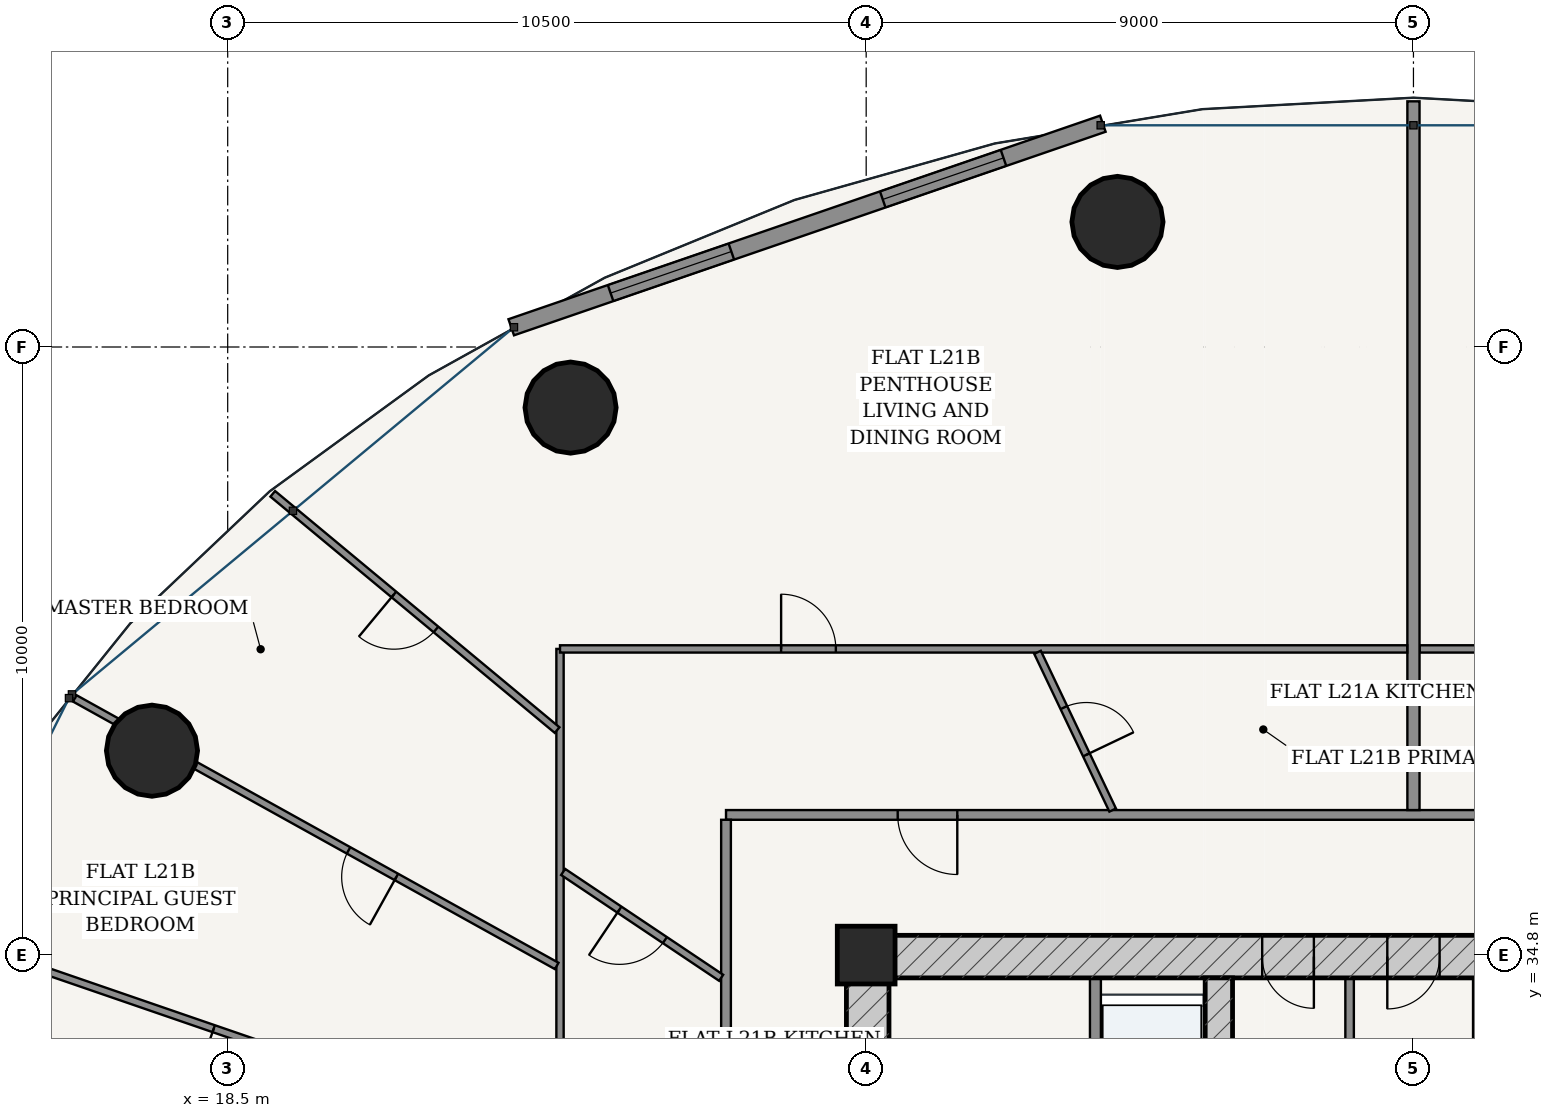
"""IFC4 building model, lengths in metres.
Left out: names, types, materials, properties, quantities, classifications, styles, units other than length and angle.
Written with IfcOpenShell. Run it as: python <this file> out.ifc"""

import sys

from ifc_helpers import new_model, si_unit, direction, frame, frame_2d, origin, origin_2d, place, context, subcontext, project, spatial, rectangle, hollow_circle, extrude, source, transform, mapped, element, fill, save


model = new_model("IFC4")
c1 = context("Model", 3, precision=1e-05, world=origin(), true_north=direction((-0.2419218956, 0.970295726276)))
c2 = subcontext(c1, "Body", "Model", "MODEL_VIEW")
j1 = project(units=[si_unit("LENGTHUNIT", "METRE"), si_unit("PLANEANGLEUNIT", "RADIAN")], contexts=[c1])
p1 = place(None, origin())
s1 = spatial("IfcSite", under=j1, at=p1, CompositionType="ELEMENT")
p2 = place(p1, origin())
s2 = spatial("IfcBuilding", under=s1, at=p2, CompositionType="ELEMENT")
p3 = place(p2, frame((0.0, 0.0, 83.4)))
s3 = spatial("IfcBuildingStorey", under=s2, at=p3, CompositionType="ELEMENT", Elevation=83.4)
p4 = place(p3, frame((29.0, 34.8, 0.0), z_axis=(0.0, 0.0, 1.0), x_axis=(1.0, 0.0, 0.0)))
e1 = element("IfcColumn", 1, at=p4, inside=s3, PredefinedType="COLUMN", context=c2, shape_type="SweptSolid", body=[
    extrude(rectangle(XDim=0.95, YDim=0.95, at=origin_2d()), origin(), (0.0, 0.0, 1.0), 3.6),
])
p5 = place(p3, frame((28.675, 34.775, 0.0), z_axis=(0.0, 0.0, 1.0), x_axis=(1.0, 0.0, 0.0)))
e2 = element("IfcWall", 2, at=p5, inside=s3, PredefinedType="SHEAR", context=c2, shape_type="SweptSolid", body=[
    extrude(rectangle(XDim=18.65, YDim=0.7, at=frame_2d((9.325, 0.0))), origin(), (0.0, 0.0, 1.0), 3.325),
])
p6 = place(p5, frame((6.837, 0.0, 0.0)))
e3 = element("IfcOpeningElement", 3, at=p6, cuts=e2, PredefinedType="OPENING", context=c2, shape_type="SweptSolid", body=[
    extrude(rectangle(XDim=0.85, YDim=2.1, at=frame_2d((0.425, 1.05))), frame((0.0, 0.36, 0.0), z_axis=(0.0, -1.0, 0.0), x_axis=(1.0, 0.0, 0.0)), (0.0, 0.0, 1.0), 0.72),
])
p7 = place(p5, frame((8.895, 0.0, 0.0)))
e4 = element("IfcOpeningElement", 4, at=p7, cuts=e2, PredefinedType="OPENING", context=c2, shape_type="SweptSolid", body=[
    extrude(rectangle(XDim=0.86, YDim=2.1, at=frame_2d((0.43, 1.05))), frame((0.0, 0.36, 0.0), z_axis=(0.0, -1.0, 0.0), x_axis=(1.0, 0.0, 0.0)), (0.0, 0.0, 1.0), 0.72),
])
p8 = place(p5, frame((10.962, 0.0, 0.0)))
e5 = element("IfcOpeningElement", 5, at=p8, cuts=e2, PredefinedType="OPENING", context=c2, shape_type="SweptSolid", body=[
    extrude(rectangle(XDim=0.85, YDim=2.1, at=frame_2d((0.425, 1.05))), frame((0.0, 0.36, 0.0), z_axis=(0.0, -1.0, 0.0), x_axis=(1.0, 0.0, 0.0)), (0.0, 0.0, 1.0), 0.72),
])
p9 = place(p3, frame((29.025, 19.175, 0.0), z_axis=(0.0, 0.0, 1.0), x_axis=(0.0, 1.0, 0.0)))
e6 = element("IfcWall", 6, at=p9, inside=s3, PredefinedType="SHEAR", context=c2, shape_type="SweptSolid", body=[
    extrude(rectangle(XDim=15.25, YDim=0.7, at=frame_2d((7.625, 0.0))), origin(), (0.0, 0.0, 1.0), 3.325),
])
p10 = place(p9, frame((9.875, 0.0, 0.0)))
e7 = element("IfcOpeningElement", 7, at=p10, cuts=e6, PredefinedType="OPENING", context=c2, shape_type="SweptSolid", body=[
    extrude(rectangle(XDim=1.5, YDim=2.2, at=frame_2d((0.75, 1.1))), frame((0.0, 0.36, 0.0), z_axis=(0.0, -1.0, 0.0), x_axis=(1.0, 0.0, 0.0)), (0.0, 0.0, 1.0), 0.72),
])
p11 = place(p3, frame((34.8, 19.175, 0.0), z_axis=(0.0, 0.0, 1.0), x_axis=(0.0, 1.0, 0.0)))
e8 = element("IfcWall", 8, at=p11, inside=s3, PredefinedType="SHEAR", context=c2, shape_type="SweptSolid", body=[
    extrude(rectangle(XDim=15.25, YDim=0.45, at=frame_2d((7.625, 0.0))), origin(), (0.0, 0.0, 1.0), 3.325),
])
p12 = place(p11, frame((7.8, 0.0, 0.0)))
e9 = element("IfcOpeningElement", 9, at=p12, cuts=e8, PredefinedType="OPENING", context=c2, shape_type="SweptSolid", body=[
    extrude(rectangle(XDim=1.05, YDim=2.15, at=frame_2d((0.525, 1.075))), frame((0.0, 0.235, 0.0), z_axis=(0.0, -1.0, 0.0), x_axis=(1.0, 0.0, 0.0)), (0.0, 0.0, 1.0), 0.47),
])
for number, where, z_axis, x_axis in (
    (10, (33.133, 46.857, 0.0), (0.0, 0.0, 1.0), (1.0, 0.0, 0.0)),
    (11, (24.138, 43.803, 0.0), (0.0, 0.0, 1.0), (1.0, 0.0, 0.0)),
    (12, (17.255, 38.161, 0.0), (0.0, 0.0, 1.0), (1.0, 0.0, 0.0)),
):
    element("IfcColumn", number, at=place(p3, frame(where, z_axis=z_axis, x_axis=x_axis)), inside=s3, PredefinedType="COLUMN", context=c2, shape_type="SweptSolid", body=[
        extrude(hollow_circle(Radius=0.75, WallThickness=0.045, at=origin_2d()), origin(), (0.0, 0.0, 1.0), 3.6),
    ])
p13 = place(p3, frame((32.892, 48.472, 0.0), z_axis=(0.0, 0.0, 1.0), x_axis=(-0.945597432299, -0.325339047809, 0.0)))
e13 = element("IfcWall", 13, at=p13, inside=s3, PredefinedType="SOLIDWALL", context=c2, shape_type="SweptSolid", body=[
    extrude(rectangle(XDim=10.289, YDim=0.28, at=frame_2d((5.145, 0.0))), origin(), (0.0, 0.0, 1.0), 3.325),
])
p14 = place(p13, frame((1.728, 0.0, 0.85)))
e14 = element("IfcOpeningElement", 14, at=p14, cuts=e13, PredefinedType="OPENING", context=c2, shape_type="SweptSolid", body=[
    extrude(rectangle(XDim=2.1, YDim=1.95, at=frame_2d((1.05, 0.975))), frame((0.0, 0.15, 0.0), z_axis=(0.0, -1.0, 0.0), x_axis=(1.0, 0.0, 0.0)), (0.0, 0.0, 1.0), 0.3),
])
p15 = place(p13, frame((6.461, 0.0, 0.85)))
e15 = element("IfcOpeningElement", 15, at=p15, cuts=e13, PredefinedType="OPENING", context=c2, shape_type="SweptSolid", body=[
    extrude(rectangle(XDim=2.1, YDim=1.95, at=frame_2d((1.05, 0.975))), frame((0.0, 0.15, 0.0), z_axis=(0.0, -1.0, 0.0), x_axis=(1.0, 0.0, 0.0)), (0.0, 0.0, 1.0), 0.3),
])
p16 = place(p3, frame((32.77, 28.52, 0.0), z_axis=(0.0, 0.0, 1.0), x_axis=(0.0, 1.0, 0.0)))
e16 = element("IfcWall", 16, at=p16, inside=s3, PredefinedType="PARTITIONING", context=c2, shape_type="SweptSolid", body=[
    extrude(rectangle(XDim=5.905, YDim=0.18, at=frame_2d((2.953, 0.0))), origin(), (0.0, 0.0, 1.0), 3.325),
])
p17 = place(p16, frame((3.655, 0.0, 0.0)))
e17 = element("IfcOpeningElement", 17, at=p17, cuts=e16, PredefinedType="OPENING", context=c2, shape_type="SweptSolid", body=[
    extrude(rectangle(XDim=1.15, YDim=2.2, at=frame_2d((0.575, 1.1))), frame((0.0, 0.1, 0.0), z_axis=(0.0, -1.0, 0.0), x_axis=(1.0, 0.0, 0.0)), (0.0, 0.0, 1.0), 0.2),
])
p18 = place(p16, frame((0.73, 0.0, 0.0)))
e18 = element("IfcOpeningElement", 18, at=p18, cuts=e16, PredefinedType="OPENING", context=c2, shape_type="SweptSolid", body=[
    extrude(rectangle(XDim=1.2, YDim=2.25, at=frame_2d((0.6, 1.125))), frame((0.0, 0.1, 0.0), z_axis=(0.0, -1.0, 0.0), x_axis=(1.0, 0.0, 0.0)), (0.0, 0.0, 1.0), 0.2),
])
for number, where, z_axis, x_axis in (
    (19, (36.95, 31.2, 0.0), (0.0, 0.0, 1.0), (0.0, 1.0, 0.0)),
    (20, (39.05, 31.2, 0.0), (0.0, 0.0, 1.0), (0.0, 1.0, 0.0)),
):
    element("IfcWall", number, at=place(p3, frame(where, z_axis=z_axis, x_axis=x_axis)), inside=s3, PredefinedType="PARTITIONING", context=c2, shape_type="SweptSolid", body=[
        extrude(rectangle(XDim=3.225, YDim=0.14, at=frame_2d((1.613, 0.0))), origin(), (0.0, 0.0, 1.0), 3.325),
    ])
p19 = place(p3, frame((26.695, 37.105, 0.0), z_axis=(0.0, 0.0, 1.0), x_axis=(1.0, 0.0, 0.0)))
e21 = element("IfcWall", 21, at=p19, inside=s3, PredefinedType="PARTITIONING", context=c2, shape_type="SweptSolid", body=[
    extrude(rectangle(XDim=22.61, YDim=0.16, at=frame_2d((11.305, 0.0))), origin(), (0.0, 0.0, 1.0), 2.767),
])
p20 = place(p19, frame((18.812, 0.0, 0.0)))
e22 = element("IfcOpeningElement", 22, at=p20, cuts=e21, PredefinedType="OPENING", context=c2, shape_type="SweptSolid", body=[
    extrude(rectangle(XDim=0.98, YDim=2.2, at=frame_2d((0.49, 1.1))), frame((0.0, 0.09, 0.0), z_axis=(0.0, -1.0, 0.0), x_axis=(1.0, 0.0, 0.0)), (0.0, 0.0, 1.0), 0.18),
])
p21 = place(p19, frame((2.823, 0.0, 0.0)))
e23 = element("IfcOpeningElement", 23, at=p21, cuts=e21, PredefinedType="OPENING", context=c2, shape_type="SweptSolid", body=[
    extrude(rectangle(XDim=0.98, YDim=2.2, at=frame_2d((0.49, 1.1))), frame((0.0, 0.09, 0.0), z_axis=(0.0, -1.0, 0.0), x_axis=(1.0, 0.0, 0.0)), (0.0, 0.0, 1.0), 0.18),
])
p22 = place(p3, frame((26.695, 16.575, 0.0), z_axis=(0.0, 0.0, 1.0), x_axis=(0.0, 1.0, 0.0)))
e24 = element("IfcWall", 24, at=p22, inside=s3, PredefinedType="PARTITIONING", context=c2, shape_type="SweptSolid", body=[
    extrude(rectangle(XDim=20.45, YDim=0.16, at=frame_2d((10.225, 0.0))), origin(), (0.0, 0.0, 1.0), 2.767),
])
p23 = place(p22, frame((1.977, 0.0, 0.0)))
e25 = element("IfcOpeningElement", 25, at=p23, cuts=e24, PredefinedType="OPENING", context=c2, shape_type="SweptSolid", body=[
    extrude(rectangle(XDim=0.98, YDim=2.2, at=frame_2d((0.49, 1.1))), frame((0.0, 0.09, 0.0), z_axis=(0.0, -1.0, 0.0), x_axis=(1.0, 0.0, 0.0)), (0.0, 0.0, 1.0), 0.18),
])
p24 = place(p3, frame((38.102, 39.835, 0.0), z_axis=(0.0, 0.0, 1.0), x_axis=(1.0, 0.0, 0.0)))
e26 = element("IfcWall", 26, at=p24, inside=s3, PredefinedType="PARTITIONING", context=c2, shape_type="SweptSolid", body=[
    extrude(rectangle(XDim=13.933, YDim=0.12, at=frame_2d((6.966, 0.0))), origin(), (0.0, 0.0, 1.0), 2.767),
])
p25 = place(p24, frame((2.769, 0.0, 0.0)))
e27 = element("IfcOpeningElement", 27, at=p25, cuts=e26, PredefinedType="OPENING", context=c2, shape_type="SweptSolid", body=[
    extrude(rectangle(XDim=0.9, YDim=2.15, at=frame_2d((0.45, 1.075))), frame((0.0, 0.07, 0.0), z_axis=(0.0, -1.0, 0.0), x_axis=(1.0, 0.0, 0.0)), (0.0, 0.0, 1.0), 0.14),
])
p26 = place(p3, frame((38.0, 37.185, 0.0), z_axis=(0.0, 0.0, 1.0), x_axis=(0.0, 1.0, 0.0)))
e28 = element("IfcWall", 28, at=p26, inside=s3, PredefinedType="PARTITIONING", context=c2, shape_type="SweptSolid", body=[
    extrude(rectangle(XDim=11.655, YDim=0.2, at=frame_2d((5.828, 0.0))), origin(), (0.0, 0.0, 1.0), 2.767),
])
p27 = place(p3, frame((23.965, 24.583, 0.0), z_axis=(0.0, 0.0, 1.0), x_axis=(0.0, 1.0, 0.0)))
e29 = element("IfcWall", 29, at=p27, inside=s3, PredefinedType="PARTITIONING", context=c2, shape_type="SweptSolid", body=[
    extrude(rectangle(XDim=15.252, YDim=0.12, at=frame_2d((7.626, 0.0))), origin(), (0.0, 0.0, 1.0), 2.767),
])
p28 = place(p3, frame((23.965, 39.835, 0.0), z_axis=(0.0, 0.0, 1.0), x_axis=(1.0, 0.0, 0.0)))
e30 = element("IfcWall", 30, at=p28, inside=s3, PredefinedType="PARTITIONING", context=c2, shape_type="SweptSolid", body=[
    extrude(rectangle(XDim=13.933, YDim=0.12, at=frame_2d((6.966, 0.0))), origin(), (0.0, 0.0, 1.0), 2.767),
])
p29 = place(p28, frame((3.636, 0.0, 0.0)))
e31 = element("IfcOpeningElement", 31, at=p29, cuts=e30, PredefinedType="OPENING", context=c2, shape_type="SweptSolid", body=[
    extrude(rectangle(XDim=0.9, YDim=2.15, at=frame_2d((0.45, 1.075))), frame((0.0, 0.07, 0.0), z_axis=(0.0, -1.0, 0.0), x_axis=(1.0, 0.0, 0.0)), (0.0, 0.0, 1.0), 0.14),
])
p30 = place(p3, frame((23.917, 38.5, 0.0), z_axis=(0.0, 0.0, 1.0), x_axis=(-0.769161827891, 0.63905405289, 0.0)))
e32 = element("IfcWall", 32, at=p30, inside=s3, PredefinedType="PARTITIONING", context=c2, shape_type="SweptSolid", body=[
    extrude(rectangle(XDim=6.08, YDim=0.12, at=frame_2d((3.04, 0.0))), origin(), (0.0, 0.0, 1.0), 2.767),
])
p31 = place(p30, frame((2.59, 0.0, 0.0)))
e33 = element("IfcOpeningElement", 33, at=p31, cuts=e32, PredefinedType="OPENING", context=c2, shape_type="SweptSolid", body=[
    extrude(rectangle(XDim=0.9, YDim=2.15, at=frame_2d((0.45, 1.075))), frame((0.0, 0.07, 0.0), z_axis=(0.0, -1.0, 0.0), x_axis=(1.0, 0.0, 0.0)), (0.0, 0.0, 1.0), 0.14),
])
p32 = place(p3, frame((23.911, 34.622, 0.0), z_axis=(0.0, 0.0, 1.0), x_axis=(-0.874324904351, 0.485341077626, 0.0)))
e34 = element("IfcWall", 34, at=p32, inside=s3, PredefinedType="PARTITIONING", context=c2, shape_type="SweptSolid", body=[
    extrude(rectangle(XDim=9.066, YDim=0.12, at=frame_2d((4.533, 0.0))), origin(), (0.0, 0.0, 1.0), 2.767),
])
p33 = place(p32, frame((3.016, 0.0, 0.0)))
e35 = element("IfcOpeningElement", 35, at=p33, cuts=e34, PredefinedType="OPENING", context=c2, shape_type="SweptSolid", body=[
    extrude(rectangle(XDim=0.9, YDim=2.15, at=frame_2d((0.45, 1.075))), frame((0.0, 0.07, 0.0), z_axis=(0.0, -1.0, 0.0), x_axis=(1.0, 0.0, 0.0)), (0.0, 0.0, 1.0), 0.14),
])
p34 = place(p3, frame((23.906, 31.65, 0.0), z_axis=(0.0, 0.0, 1.0), x_axis=(-0.945573120726, 0.32540970078, 0.0)))
e36 = element("IfcWall", 36, at=p34, inside=s3, PredefinedType="PARTITIONING", context=c2, shape_type="SweptSolid", body=[
    extrude(rectangle(XDim=11.022, YDim=0.12, at=frame_2d((5.511, 0.0))), origin(), (0.0, 0.0, 1.0), 2.767),
])
p35 = place(p34, frame((5.061, 0.0, 0.0)))
e37 = element("IfcOpeningElement", 37, at=p35, cuts=e36, PredefinedType="OPENING", context=c2, shape_type="SweptSolid", body=[
    extrude(rectangle(XDim=0.9, YDim=2.15, at=frame_2d((0.45, 1.075))), frame((0.0, 0.07, 0.0), z_axis=(0.0, -1.0, 0.0), x_axis=(1.0, 0.0, 0.0)), (0.0, 0.0, 1.0), 0.14),
])
p36 = place(p3, frame((33.053, 37.185, 0.0), z_axis=(0.0, 0.0, 1.0), x_axis=(-0.429966564324, 0.902844811451, 0.0)))
e38 = element("IfcWall", 38, at=p36, inside=s3, PredefinedType="PARTITIONING", context=c2, shape_type="SweptSolid", body=[
    extrude(rectangle(XDim=2.873, YDim=0.12, at=frame_2d((1.437, 0.0))), origin(), (0.0, 0.0, 1.0), 3.325),
])
p37 = place(p36, frame((1.007, 0.0, 0.0)))
e39 = element("IfcOpeningElement", 39, at=p37, cuts=e38, PredefinedType="OPENING", context=c2, shape_type="SweptSolid", body=[
    extrude(rectangle(XDim=0.86, YDim=2.15, at=frame_2d((0.43, 1.075))), frame((0.0, 0.07, 0.0), z_axis=(0.0, -1.0, 0.0), x_axis=(1.0, 0.0, 0.0)), (0.0, 0.0, 1.0), 0.14),
])
p38 = place(p3, frame((26.615, 34.427, 0.0), z_axis=(0.0, 0.0, 1.0), x_axis=(-0.830799215213, 0.556572245088, 0.0)))
e40 = element("IfcWall", 40, at=p38, inside=s3, PredefinedType="PARTITIONING", context=c2, shape_type="SweptSolid", body=[
    extrude(rectangle(XDim=3.128, YDim=0.12, at=frame_2d((1.564, 0.0))), origin(), (0.0, 0.0, 1.0), 3.004),
])
p39 = place(p38, frame((1.114, 0.0, 0.0)))
e41 = element("IfcOpeningElement", 41, at=p39, cuts=e40, PredefinedType="OPENING", context=c2, shape_type="SweptSolid", body=[
    extrude(rectangle(XDim=0.9, YDim=2.15, at=frame_2d((0.45, 1.075))), frame((0.0, 0.07, 0.0), z_axis=(0.0, -1.0, 0.0), x_axis=(1.0, 0.0, 0.0)), (0.0, 0.0, 1.0), 0.14),
])
m1 = source(origin(), c2, "Body", "SweptSolid", [
    extrude(rectangle(XDim=2.1, YDim=1.95, at=frame_2d((1.05, 0.975))), frame((0.0, 0.03, 0.0), z_axis=(0.0, -1.0, 0.0), x_axis=(1.0, 0.0, 0.0)), (0.0, 0.0, 1.0), 0.06),
])
p40 = place(p14, origin())
e42 = element("IfcWindow", 42, at=p40, inside=s3, PartitioningType="SINGLE_PANEL", PredefinedType="WINDOW", context=c2, shape_type="MappedRepresentation", body=[
    mapped(m1, transform((0.0, 0.0, 0.0), scale=1.0)),
])
fill(e14, e42)
p41 = place(p15, origin())
e43 = element("IfcWindow", 43, at=p41, inside=s3, PartitioningType="SINGLE_PANEL", PredefinedType="WINDOW", context=c2, shape_type="MappedRepresentation", body=[
    mapped(m1, transform((0.0, 0.0, 0.0), scale=1.0)),
])
fill(e15, e43)
m2 = source(origin(), c2, "Body", "SweptSolid", [
    extrude(rectangle(XDim=0.85, YDim=2.1, at=frame_2d((0.425, 1.05))), frame((0.0, 0.025, 0.0), z_axis=(0.0, -1.0, 0.0), x_axis=(1.0, 0.0, 0.0)), (0.0, 0.0, 1.0), 0.05),
])
p42 = place(p6, frame((0.85, 0.0, 0.0), z_axis=(0.0, 0.0, 1.0), x_axis=(-1.0, 0.0, 0.0)))
e44 = element("IfcDoor", 44, at=p42, inside=s3, OperationType="SINGLE_SWING_LEFT", PredefinedType="DOOR", context=c2, shape_type="MappedRepresentation", body=[
    mapped(m2, transform((0.0, 0.0, 0.0), scale=1.0)),
])
fill(e3, e44)
m3 = source(origin(), c2, "Body", "SweptSolid", [
    extrude(rectangle(XDim=0.86, YDim=2.1, at=frame_2d((0.43, 1.05))), frame((0.0, 0.025, 0.0), z_axis=(0.0, -1.0, 0.0), x_axis=(1.0, 0.0, 0.0)), (0.0, 0.0, 1.0), 0.05),
])
p43 = place(p7, frame((0.86, 0.0, 0.0), z_axis=(0.0, 0.0, 1.0), x_axis=(-1.0, 0.0, 0.0)))
e45 = element("IfcDoor", 45, at=p43, inside=s3, OperationType="SINGLE_SWING_RIGHT", PredefinedType="DOOR", context=c2, shape_type="MappedRepresentation", body=[
    mapped(m3, transform((0.0, 0.0, 0.0), scale=1.0)),
])
fill(e4, e45)
m4 = source(origin(), c2, "Body", "SweptSolid", [
    extrude(rectangle(XDim=0.98, YDim=2.2, at=frame_2d((0.49, 1.1))), frame((0.0, 0.025, 0.0), z_axis=(0.0, -1.0, 0.0), x_axis=(1.0, 0.0, 0.0)), (0.0, 0.0, 1.0), 0.05),
])
p44 = place(p21, frame((0.98, 0.0, 0.0), z_axis=(0.0, 0.0, 1.0), x_axis=(-1.0, 0.0, 0.0)))
e46 = element("IfcDoor", 46, at=p44, inside=s3, OperationType="SINGLE_SWING_LEFT", PredefinedType="DOOR", context=c2, shape_type="MappedRepresentation", body=[
    mapped(m4, transform((0.0, 0.0, 0.0), scale=1.0)),
])
fill(e23, e46)
m5 = source(origin(), c2, "Body", "SweptSolid", [
    extrude(rectangle(XDim=0.86, YDim=2.15, at=frame_2d((0.43, 1.075))), frame((0.0, 0.025, 0.0), z_axis=(0.0, -1.0, 0.0), x_axis=(1.0, 0.0, 0.0)), (0.0, 0.0, 1.0), 0.05),
])
p45 = place(p37, frame((0.86, 0.0, 0.0), z_axis=(0.0, 0.0, 1.0), x_axis=(-1.0, 0.0, 0.0)))
e47 = element("IfcDoor", 47, at=p45, inside=s3, OperationType="SINGLE_SWING_RIGHT", PredefinedType="DOOR", context=c2, shape_type="MappedRepresentation", body=[
    mapped(m5, transform((0.0, 0.0, 0.0), scale=1.0)),
])
fill(e39, e47)
m6 = source(origin(), c2, "Body", "SweptSolid", [
    extrude(rectangle(XDim=0.9, YDim=2.15, at=frame_2d((0.45, 1.075))), frame((0.0, 0.025, 0.0), z_axis=(0.0, -1.0, 0.0), x_axis=(1.0, 0.0, 0.0)), (0.0, 0.0, 1.0), 0.05),
])
p46 = place(p29, origin())
e48 = element("IfcDoor", 48, at=p46, inside=s3, OperationType="SINGLE_SWING_LEFT", PredefinedType="DOOR", context=c2, shape_type="MappedRepresentation", body=[
    mapped(m6, transform((0.0, 0.0, 0.0), scale=1.0)),
])
fill(e31, e48)
p47 = place(p39, origin())
e49 = element("IfcDoor", 49, at=p47, inside=s3, OperationType="SINGLE_SWING_RIGHT", PredefinedType="DOOR", context=c2, shape_type="MappedRepresentation", body=[
    mapped(m6, transform((0.0, 0.0, 0.0), scale=1.0)),
])
fill(e41, e49)
p48 = place(p31, origin())
e50 = element("IfcDoor", 50, at=p48, inside=s3, OperationType="SINGLE_SWING_RIGHT", PredefinedType="DOOR", context=c2, shape_type="MappedRepresentation", body=[
    mapped(m6, transform((0.0, 0.0, 0.0), scale=1.0)),
])
fill(e33, e50)
p49 = place(p33, origin())
e51 = element("IfcDoor", 51, at=p49, inside=s3, OperationType="SINGLE_SWING_LEFT", PredefinedType="DOOR", context=c2, shape_type="MappedRepresentation", body=[
    mapped(m6, transform((0.0, 0.0, 0.0), scale=1.0)),
])
fill(e35, e51)
p50 = place(p35, origin())
e52 = element("IfcDoor", 52, at=p50, inside=s3, OperationType="SINGLE_SWING_RIGHT", PredefinedType="DOOR", context=c2, shape_type="MappedRepresentation", body=[
    mapped(m6, transform((0.0, 0.0, 0.0), scale=1.0)),
])
fill(e37, e52)
save(model, sys.argv[1])
